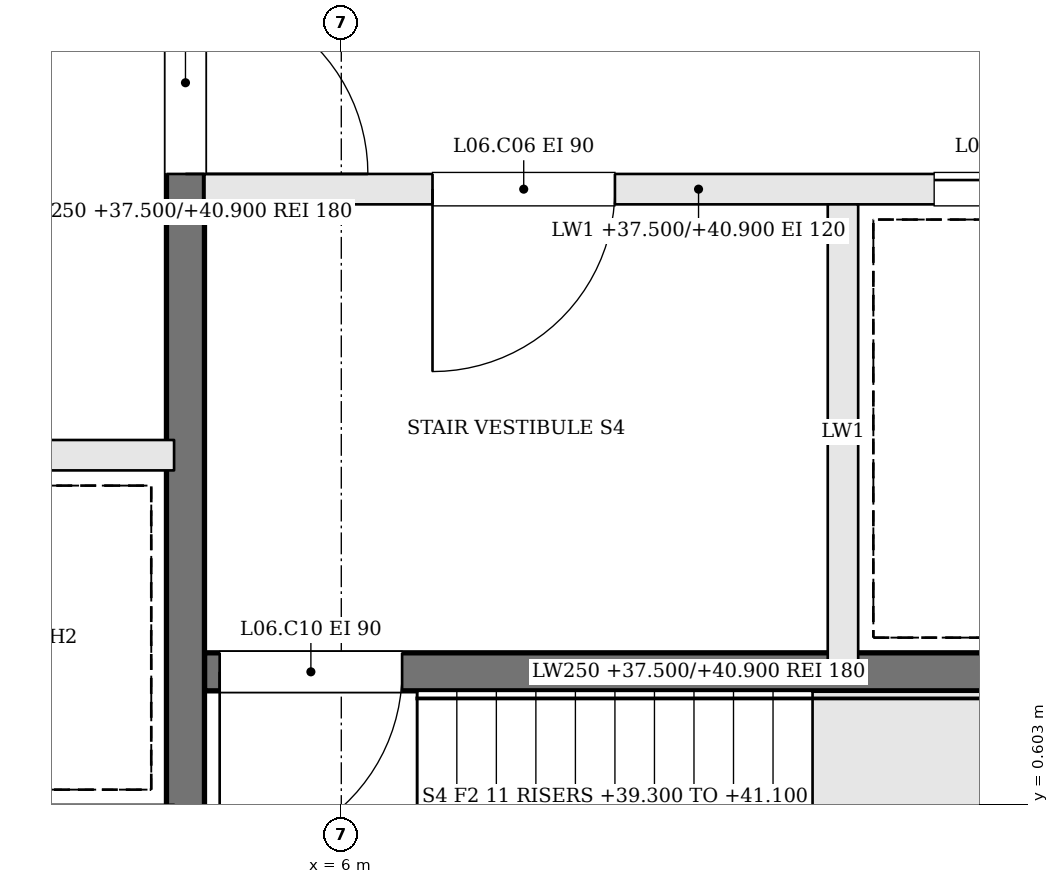
"""IFC4 building model, lengths in metres.
Left out: names, types, materials, properties, quantities, classifications, styles, units other than length and angle.
Written with IfcOpenShell. Run it as: python <this file> out.ifc"""

import sys

from ifc_helpers import new_model, si_unit, direction, frame, frame_2d, origin, place, context, subcontext, project, spatial, rectangle, extrude, element, fill, save


model = new_model("IFC4")
c1 = context("Model", 3, precision=1e-05, world=origin(), true_north=direction((0.0, 1.0)))
c2 = subcontext(c1, "Body", "Model", "MODEL_VIEW")
j1 = project(units=[si_unit("LENGTHUNIT", "METRE"), si_unit("PLANEANGLEUNIT", "RADIAN")], contexts=[c1])
p1 = place(None, origin())
s1 = spatial("IfcSite", under=j1, at=p1, CompositionType="ELEMENT")
p2 = place(p1, origin())
s2 = spatial("IfcBuilding", under=s1, at=p2, CompositionType="ELEMENT")
p3 = place(p2, frame((0.0, 0.0, 37.5)))
s3 = spatial("IfcBuildingStorey", under=s2, at=p3, CompositionType="ELEMENT", Elevation=37.5)
p4 = place(p3, frame((11.6, 4.65, 0.0), z_axis=(0.0, 0.0, 1.0), x_axis=(-1.0, 0.0, 0.0)))
e1 = element("IfcWall", 1, at=p4, inside=s3, PredefinedType="SOLIDWALL", context=c2, shape_type="SweptSolid", body=[
    extrude(rectangle(XDim=6.5, YDim=0.2, at=frame_2d((3.25, 0.0))), origin(), (0.0, 0.0, 1.0), 3.4),
])
p5 = place(p4, frame((3.8, 0.0, 0.0)))
e2 = element("IfcOpeningElement", 2, at=p5, cuts=e1, PredefinedType="OPENING", context=c2, shape_type="SweptSolid", body=[
    extrude(rectangle(XDim=1.2, YDim=2.1, at=frame_2d((0.6, 1.05))), frame((0.0, 0.11, 0.0), z_axis=(0.0, -1.0, 0.0), x_axis=(1.0, 0.0, 0.0)), (0.0, 0.0, 1.0), 0.22),
])
p6 = place(p4, frame((0.5, 0.0, 0.0)))
e3 = element("IfcOpeningElement", 3, at=p6, cuts=e1, PredefinedType="OPENING", context=c2, shape_type="SweptSolid", body=[
    extrude(rectangle(XDim=1.2, YDim=2.1, at=frame_2d((0.6, 1.05))), frame((0.0, 0.11, 0.0), z_axis=(0.0, -1.0, 0.0), x_axis=(1.0, 0.0, 0.0)), (0.0, 0.0, 1.0), 0.22),
])
p7 = place(p3, frame((11.6, 1.475, 0.0), z_axis=(0.0, 0.0, 1.0), x_axis=(-1.0, 0.0, 0.0)))
e4 = element("IfcWall", 4, at=p7, inside=s3, PredefinedType="SOLIDWALL", context=c2, shape_type="SweptSolid", body=[
    extrude(rectangle(XDim=6.5, YDim=0.25, at=frame_2d((3.25, 0.0))), origin(), (0.0, 0.0, 1.0), 3.4),
])
p8 = place(p7, frame((5.2, 0.0, 0.0)))
e5 = element("IfcOpeningElement", 5, at=p8, cuts=e4, PredefinedType="OPENING", context=c2, shape_type="SweptSolid", body=[
    extrude(rectangle(XDim=1.2, YDim=2.1, at=frame_2d((0.6, 1.05))), frame((0.0, 0.135, 0.0), z_axis=(0.0, -1.0, 0.0), x_axis=(1.0, 0.0, 0.0)), (0.0, 0.0, 1.0), 0.27),
])
p9 = place(p3, frame((9.3, 4.55, 0.0), z_axis=(0.0, 0.0, 1.0), x_axis=(0.0, -1.0, 0.0)))
e6 = element("IfcWall", 6, at=p9, inside=s3, PredefinedType="SOLIDWALL", context=c2, shape_type="SweptSolid", body=[
    extrude(rectangle(XDim=3.0, YDim=0.2, at=frame_2d((1.5, 0.0))), origin(), (0.0, 0.0, 1.0), 3.4),
])
p10 = place(p3, frame((4.975, 10.6, 0.0), z_axis=(0.0, 0.0, 1.0), x_axis=(0.0, -1.0, 0.0)))
e7 = element("IfcWall", 7, at=p10, inside=s3, PredefinedType="SOLIDWALL", context=c2, shape_type="SweptSolid", body=[
    extrude(rectangle(XDim=12.2, YDim=0.25, at=frame_2d((6.1, 0.0))), origin(), (0.0, 0.0, 1.0), 3.4),
])
p11 = place(p10, frame((4.65, 0.0, 0.0)))
e8 = element("IfcOpeningElement", 8, at=p11, cuts=e7, PredefinedType="OPENING", context=c2, shape_type="SweptSolid", body=[
    extrude(rectangle(XDim=1.2, YDim=2.1, at=frame_2d((0.6, 1.05))), frame((0.0, 0.135, 0.0), z_axis=(0.0, -1.0, 0.0), x_axis=(1.0, 0.0, 0.0)), (0.0, 0.0, 1.0), 0.27),
])
p12 = place(p3, frame((-4.9, 2.9, 0.0), z_axis=(0.0, 0.0, 1.0), x_axis=(1.0, 0.0, 0.0)))
e9 = element("IfcWall", 9, at=p12, inside=s3, PredefinedType="SOLIDWALL", context=c2, shape_type="SweptSolid", body=[
    extrude(rectangle(XDim=9.8, YDim=0.2, at=frame_2d((4.9, 0.0))), origin(), (0.0, 0.0, 1.0), 3.4),
])
p13 = place(p12, frame((0.675, 0.0, 0.0)))
e10 = element("IfcOpeningElement", 10, at=p13, cuts=e9, PredefinedType="OPENING", context=c2, shape_type="SweptSolid", body=[
    extrude(rectangle(XDim=1.1, YDim=2.1, at=frame_2d((0.55, 1.05))), frame((0.0, 0.11, 0.0), z_axis=(0.0, -1.0, 0.0), x_axis=(1.0, 0.0, 0.0)), (0.0, 0.0, 1.0), 0.22),
])
p14 = place(p12, frame((3.125, 0.0, 0.0)))
e11 = element("IfcOpeningElement", 11, at=p14, cuts=e9, PredefinedType="OPENING", context=c2, shape_type="SweptSolid", body=[
    extrude(rectangle(XDim=1.1, YDim=2.1, at=frame_2d((0.55, 1.05))), frame((0.0, 0.11, 0.0), z_axis=(0.0, -1.0, 0.0), x_axis=(1.0, 0.0, 0.0)), (0.0, 0.0, 1.0), 0.22),
])
p15 = place(p11, origin())
e12 = element("IfcDoor", 12, at=p15, inside=s3, OperationType="SINGLE_SWING_RIGHT", PredefinedType="DOOR", context=c2, shape_type="SweptSolid", body=[
    extrude(rectangle(XDim=1.2, YDim=2.1, at=frame_2d((0.6, 1.05))), frame((0.0, 0.025, 0.0), z_axis=(0.0, -1.0, 0.0), x_axis=(1.0, 0.0, 0.0)), (0.0, 0.0, 1.0), 0.05),
])
fill(e8, e12)
p16 = place(p5, origin())
e13 = element("IfcDoor", 13, at=p16, inside=s3, OperationType="SINGLE_SWING_RIGHT", PredefinedType="DOOR", context=c2, shape_type="SweptSolid", body=[
    extrude(rectangle(XDim=1.2, YDim=2.1, at=frame_2d((0.6, 1.05))), frame((0.0, 0.025, 0.0), z_axis=(0.0, -1.0, 0.0), x_axis=(1.0, 0.0, 0.0)), (0.0, 0.0, 1.0), 0.05),
])
fill(e2, e13)
p17 = place(p8, origin())
e14 = element("IfcDoor", 14, at=p17, inside=s3, OperationType="SINGLE_SWING_RIGHT", PredefinedType="DOOR", context=c2, shape_type="SweptSolid", body=[
    extrude(rectangle(XDim=1.2, YDim=2.1, at=frame_2d((0.6, 1.05))), frame((0.0, 0.025, 0.0), z_axis=(0.0, -1.0, 0.0), x_axis=(1.0, 0.0, 0.0)), (0.0, 0.0, 1.0), 0.05),
])
fill(e5, e14)
p18 = place(p6, origin())
e15 = element("IfcDoor", 15, at=p18, inside=s3, OperationType="SLIDING_TO_RIGHT", PredefinedType="DOOR", context=c2, shape_type="SweptSolid", body=[
    extrude(rectangle(XDim=1.2, YDim=2.1, at=frame_2d((0.6, 1.05))), frame((0.0, 0.025, 0.0), z_axis=(0.0, -1.0, 0.0), x_axis=(1.0, 0.0, 0.0)), (0.0, 0.0, 1.0), 0.05),
])
fill(e3, e15)
save(model, sys.argv[1])
